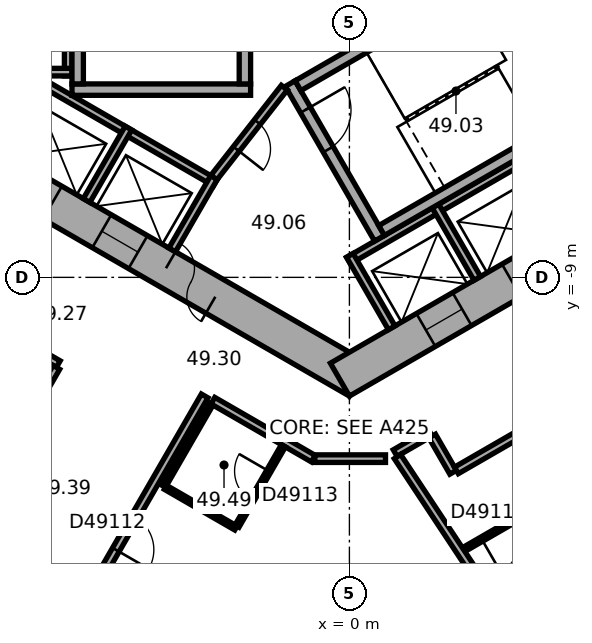
"""IFC4 building model, lengths in metres.
Left out: names, types, materials, properties, quantities, classifications, styles, units other than length and angle.
Written with IfcOpenShell. Run it as: python <this file> out.ifc"""

import sys

from ifc_helpers import new_model, si_unit, direction, frame, frame_2d, origin, place, context, subcontext, project, spatial, rectangle, extrude, element, fill, save


model = new_model("IFC4")
c1 = context("Model", 3, precision=1e-05, world=origin(), true_north=direction((0.0, 1.0)))
c2 = subcontext(c1, "Body", "Model", "MODEL_VIEW")
j1 = project(units=[si_unit("LENGTHUNIT", "METRE"), si_unit("PLANEANGLEUNIT", "RADIAN")], contexts=[c1])
p1 = place(None, origin())
s1 = spatial("IfcSite", under=j1, at=p1, CompositionType="ELEMENT")
p2 = place(p1, origin())
s2 = spatial("IfcBuilding", under=s1, at=p2, CompositionType="ELEMENT")
p3 = place(p2, frame((0.0, 0.0, 198.4)))
s3 = spatial("IfcBuildingStorey", under=s2, at=p3, CompositionType="ELEMENT", Elevation=198.4)
p4 = place(p3, frame((-10.25, -5.629, 0.0), z_axis=(0.0, 0.0, 1.0), x_axis=(0.866022616891, -0.50000482701, 0.0)))
e1 = element("IfcWall", 1, at=p4, inside=s3, PredefinedType="SHEAR", context=c2, shape_type="SweptSolid", body=[
    extrude(rectangle(XDim=12.125, YDim=1.0, at=frame_2d((6.062, 0.0))), origin(), (0.0, 0.0, 1.0), 3.7),
])
p5 = place(p4, frame((6.262, 0.0, 0.0)))
e2 = element("IfcOpeningElement", 2, at=p5, cuts=e1, PredefinedType="OPENING", context=c2, shape_type="SweptSolid", body=[
    extrude(rectangle(XDim=1.5, YDim=2.1, at=frame_2d((0.75, 1.05))), frame((0.0, 0.51, 0.0), z_axis=(0.0, -1.0, 0.0), x_axis=(1.0, 0.0, 0.0)), (0.0, 0.0, 1.0), 1.02),
])
p6 = place(p4, frame((1.712, 0.0, 0.0)))
e3 = element("IfcOpeningElement", 3, at=p6, cuts=e1, PredefinedType="OPENING", context=c2, shape_type="SweptSolid", body=[
    extrude(rectangle(XDim=1.1, YDim=2.1, at=frame_2d((0.55, 1.05))), frame((0.0, 0.51, 0.0), z_axis=(0.0, -1.0, 0.0), x_axis=(1.0, 0.0, 0.0)), (0.0, 0.0, 1.0), 1.02),
])
p7 = place(p4, frame((4.312, 0.0, 0.0)))
e4 = element("IfcOpeningElement", 4, at=p7, cuts=e1, PredefinedType="OPENING", context=c2, shape_type="SweptSolid", body=[
    extrude(rectangle(XDim=1.1, YDim=2.1, at=frame_2d((0.55, 1.05))), frame((0.0, 0.51, 0.0), z_axis=(0.0, -1.0, 0.0), x_axis=(1.0, 0.0, 0.0)), (0.0, 0.0, 1.0), 1.02),
])
p8 = place(p3, frame((-0.25, -11.691, 0.0), z_axis=(0.0, 0.0, 1.0), x_axis=(0.866022616891, 0.50000482701, 0.0)))
e5 = element("IfcWall", 5, at=p8, inside=s3, PredefinedType="SHEAR", context=c2, shape_type="SweptSolid", body=[
    extrude(rectangle(XDim=12.125, YDim=1.0, at=frame_2d((6.062, 0.0))), origin(), (0.0, 0.0, 1.0), 3.7),
])
p9 = place(p8, frame((2.612, 0.0, 0.0)))
e6 = element("IfcOpeningElement", 6, at=p9, cuts=e5, PredefinedType="OPENING", context=c2, shape_type="SweptSolid", body=[
    extrude(rectangle(XDim=1.1, YDim=2.1, at=frame_2d((0.55, 1.05))), frame((0.0, 0.51, 0.0), z_axis=(0.0, -1.0, 0.0), x_axis=(1.0, 0.0, 0.0)), (0.0, 0.0, 1.0), 1.02),
])
p10 = place(p8, frame((5.212, 0.0, 0.0)))
e7 = element("IfcOpeningElement", 7, at=p10, cuts=e5, PredefinedType="OPENING", context=c2, shape_type="SweptSolid", body=[
    extrude(rectangle(XDim=1.1, YDim=2.1, at=frame_2d((0.55, 1.05))), frame((0.0, 0.51, 0.0), z_axis=(0.0, -1.0, 0.0), x_axis=(1.0, 0.0, 0.0)), (0.0, 0.0, 1.0), 1.02),
])
p11 = place(p8, frame((7.812, 0.0, 0.0)))
e8 = element("IfcOpeningElement", 8, at=p11, cuts=e5, PredefinedType="OPENING", context=c2, shape_type="SweptSolid", body=[
    extrude(rectangle(XDim=1.1, YDim=2.1, at=frame_2d((0.55, 1.05))), frame((0.0, 0.51, 0.0), z_axis=(0.0, -1.0, 0.0), x_axis=(1.0, 0.0, 0.0)), (0.0, 0.0, 1.0), 1.02),
])
p12 = place(p3, frame((-18.789, -14.267, 0.0), z_axis=(0.0, 0.0, 1.0), x_axis=(0.866023315909, -0.500003616288, 0.0)))
e9 = element("IfcWall", 9, at=p12, inside=s3, PredefinedType="STANDARD", context=c2, shape_type="SweptSolid", body=[
    extrude(rectangle(XDim=20.044, YDim=0.2, at=frame_2d((10.022, 0.0))), origin(), (0.0, 0.0, 1.0), 3.7),
])
p13 = place(p12, frame((1.314, 0.0, 0.9)))
e10 = element("IfcOpeningElement", 10, at=p13, cuts=e9, PredefinedType="OPENING", context=c2, shape_type="SweptSolid", body=[
    extrude(rectangle(XDim=2.4, YDim=2.0, at=frame_2d((1.2, 1.0))), frame((0.0, 0.11, 0.0), z_axis=(0.0, -1.0, 0.0), x_axis=(1.0, 0.0, 0.0)), (0.0, 0.0, 1.0), 0.22),
])
p14 = place(p12, frame((5.069, 0.0, 0.9)))
e11 = element("IfcOpeningElement", 11, at=p14, cuts=e9, PredefinedType="OPENING", context=c2, shape_type="SweptSolid", body=[
    extrude(rectangle(XDim=2.4, YDim=2.0, at=frame_2d((1.2, 1.0))), frame((0.0, 0.11, 0.0), z_axis=(0.0, -1.0, 0.0), x_axis=(1.0, 0.0, 0.0)), (0.0, 0.0, 1.0), 0.22),
])
p15 = place(p12, frame((8.823, 0.0, 0.9)))
e12 = element("IfcOpeningElement", 12, at=p15, cuts=e9, PredefinedType="OPENING", context=c2, shape_type="SweptSolid", body=[
    extrude(rectangle(XDim=2.4, YDim=2.0, at=frame_2d((1.2, 1.0))), frame((0.0, 0.11, 0.0), z_axis=(0.0, -1.0, 0.0), x_axis=(1.0, 0.0, 0.0)), (0.0, 0.0, 1.0), 0.22),
])
p16 = place(p12, frame((12.577, 0.0, 0.9)))
e13 = element("IfcOpeningElement", 13, at=p16, cuts=e9, PredefinedType="OPENING", context=c2, shape_type="SweptSolid", body=[
    extrude(rectangle(XDim=2.4, YDim=2.0, at=frame_2d((1.2, 1.0))), frame((0.0, 0.11, 0.0), z_axis=(0.0, -1.0, 0.0), x_axis=(1.0, 0.0, 0.0)), (0.0, 0.0, 1.0), 0.22),
])
p17 = place(p12, frame((16.331, 0.0, 0.9)))
e14 = element("IfcOpeningElement", 14, at=p17, cuts=e9, PredefinedType="OPENING", context=c2, shape_type="SweptSolid", body=[
    extrude(rectangle(XDim=2.4, YDim=2.0, at=frame_2d((1.2, 1.0))), frame((0.0, 0.11, 0.0), z_axis=(0.0, -1.0, 0.0), x_axis=(1.0, 0.0, 0.0)), (0.0, 0.0, 1.0), 0.22),
])
p18 = place(p3, frame((2.911, -24.156, 0.0), z_axis=(0.0, 0.0, 1.0), x_axis=(0.833882163564, 0.551942512668, 0.0)))
e15 = element("IfcWall", 15, at=p18, inside=s3, PredefinedType="STANDARD", context=c2, shape_type="SweptSolid", body=[
    extrude(rectangle(XDim=20.044, YDim=0.2, at=frame_2d((10.022, 0.0))), origin(), (0.0, 0.0, 1.0), 3.7),
])
p19 = place(p18, frame((1.313, 0.0, 0.9)))
e16 = element("IfcOpeningElement", 16, at=p19, cuts=e15, PredefinedType="OPENING", context=c2, shape_type="SweptSolid", body=[
    extrude(rectangle(XDim=2.4, YDim=2.0, at=frame_2d((1.2, 1.0))), frame((0.0, 0.11, 0.0), z_axis=(0.0, -1.0, 0.0), x_axis=(1.0, 0.0, 0.0)), (0.0, 0.0, 1.0), 0.22),
])
p20 = place(p18, frame((5.067, 0.0, 0.9)))
e17 = element("IfcOpeningElement", 17, at=p20, cuts=e15, PredefinedType="OPENING", context=c2, shape_type="SweptSolid", body=[
    extrude(rectangle(XDim=2.4, YDim=2.0, at=frame_2d((1.2, 1.0))), frame((0.0, 0.11, 0.0), z_axis=(0.0, -1.0, 0.0), x_axis=(1.0, 0.0, 0.0)), (0.0, 0.0, 1.0), 0.22),
])
p21 = place(p18, frame((8.821, 0.0, 0.9)))
e18 = element("IfcOpeningElement", 18, at=p21, cuts=e15, PredefinedType="OPENING", context=c2, shape_type="SweptSolid", body=[
    extrude(rectangle(XDim=2.4, YDim=2.0, at=frame_2d((1.2, 1.0))), frame((0.0, 0.11, 0.0), z_axis=(0.0, -1.0, 0.0), x_axis=(1.0, 0.0, 0.0)), (0.0, 0.0, 1.0), 0.22),
])
p22 = place(p18, frame((12.575, 0.0, 0.9)))
e19 = element("IfcOpeningElement", 19, at=p22, cuts=e15, PredefinedType="OPENING", context=c2, shape_type="SweptSolid", body=[
    extrude(rectangle(XDim=2.4, YDim=2.0, at=frame_2d((1.2, 1.0))), frame((0.0, 0.11, 0.0), z_axis=(0.0, -1.0, 0.0), x_axis=(1.0, 0.0, 0.0)), (0.0, 0.0, 1.0), 0.22),
])
p23 = place(p18, frame((16.329, 0.0, 0.9)))
e20 = element("IfcOpeningElement", 20, at=p23, cuts=e15, PredefinedType="OPENING", context=c2, shape_type="SweptSolid", body=[
    extrude(rectangle(XDim=2.4, YDim=2.0, at=frame_2d((1.2, 1.0))), frame((0.0, 0.11, 0.0), z_axis=(0.0, -1.0, 0.0), x_axis=(1.0, 0.0, 0.0)), (0.0, 0.0, 1.0), 0.22),
])
p24 = place(p3, frame((-7.4, 4.3, 0.0), z_axis=(0.0, 0.0, 1.0), x_axis=(0.0, -1.0, 0.0)))
e21 = element("IfcWall", 21, at=p24, inside=s3, PredefinedType="PARTITIONING", context=c2, shape_type="SweptSolid", body=[
    extrude(rectangle(XDim=8.0, YDim=0.2, at=frame_2d((4.0, 0.0))), origin(), (0.0, 0.0, 1.0), 3.42),
])
p25 = place(p3, frame((-7.3, -3.6, 0.0), z_axis=(0.0, 0.0, 1.0), x_axis=(-1.0, 0.0, 0.0)))
e22 = element("IfcWall", 22, at=p25, inside=s3, PredefinedType="PARTITIONING", context=c2, shape_type="SweptSolid", body=[
    extrude(rectangle(XDim=2.2, YDim=0.2, at=frame_2d((1.1, 0.0))), origin(), (0.0, 0.0, 1.0), 3.42),
])
p26 = place(p3, frame((-8.203, -3.809, 0.0), z_axis=(0.0, 0.0, 1.0), x_axis=(0.866028230842, -0.499995103361, 0.0)))
e23 = element("IfcWall", 23, at=p26, inside=s3, PredefinedType="PARTITIONING", context=c2, shape_type="SweptSolid", body=[
    extrude(rectangle(XDim=5.4, YDim=0.2, at=frame_2d((2.7, 0.0))), origin(), (0.0, 0.0, 1.0), 3.42),
])
p27 = place(p3, frame((-5.815, -5.072, 0.0), z_axis=(0.0, 0.0, 1.0), x_axis=(-0.499946605688, -0.86605622881, 0.0)))
e24 = element("IfcWall", 24, at=p27, inside=s3, PredefinedType="PARTITIONING", context=c2, shape_type="SweptSolid", body=[
    extrude(rectangle(XDim=2.2, YDim=0.2, at=frame_2d((1.1, 0.0))), origin(), (0.0, 0.0, 1.0), 3.42),
])
p28 = place(p3, frame((-3.563, -6.372, 0.0), z_axis=(0.0, 0.0, 1.0), x_axis=(-0.499994660107, -0.866028486751, 0.0)))
e25 = element("IfcWall", 25, at=p28, inside=s3, PredefinedType="PARTITIONING", context=c2, shape_type="SweptSolid", body=[
    extrude(rectangle(XDim=2.2, YDim=0.2, at=frame_2d((1.1, 0.0))), origin(), (0.0, 0.0, 1.0), 3.42),
])
p29 = place(p3, frame((-0.024, -8.559, 0.0), z_axis=(0.0, 0.0, 1.0), x_axis=(0.866026010844, 0.49999894854, 0.0)))
e26 = element("IfcWall", 26, at=p29, inside=s3, PredefinedType="PARTITIONING", context=c2, shape_type="SweptSolid", body=[
    extrude(rectangle(XDim=8.0, YDim=0.2, at=frame_2d((4.0, 0.0))), origin(), (0.0, 0.0, 1.0), 3.42),
])
for number, where, z_axis, x_axis in (
    (27, (0.013, -8.422, 0.0), (0.0, 0.0, 1.0), (0.5, -0.866, 0.0)),
    (28, (2.264, -7.122, 0.0), (0.0, 0.0, 1.0), (0.5, -0.866, 0.0)),
):
    element("IfcWall", number, at=place(p3, frame(where, z_axis=z_axis, x_axis=x_axis)), inside=s3, PredefinedType="PARTITIONING", context=c2, shape_type="SweptSolid", body=[
        extrude(rectangle(XDim=2.2, YDim=0.2, at=frame_2d((1.1, 0.0))), origin(), (0.0, 0.0, 1.0), 3.42),
    ])
p30 = place(p3, frame((-2.6, -4.06, 0.0), z_axis=(0.0, 0.0, 1.0), x_axis=(-1.0, 0.0, 0.0)))
e29 = element("IfcWall", 29, at=p30, inside=s3, PredefinedType="SHEAR", context=c2, shape_type="SweptSolid", body=[
    extrude(rectangle(XDim=4.7, YDim=0.3, at=frame_2d((2.35, 0.0))), origin(), (0.0, 0.0, 1.0), 3.42),
])
for number, where, z_axis, x_axis in (
    (30, (-2.75, 3.15, 0.0), (0.0, 0.0, 1.0), (0.0, -1.0, 0.0)),
    (31, (-7.15, 3.15, 0.0), (0.0, 0.0, 1.0), (0.0, -1.0, 0.0)),
):
    element("IfcWall", number, at=place(p3, frame(where, z_axis=z_axis, x_axis=x_axis)), inside=s3, PredefinedType="SHEAR", context=c2, shape_type="SweptSolid", body=[
        extrude(rectangle(XDim=7.06, YDim=0.3, at=frame_2d((3.53, 0.0))), origin(), (0.0, 0.0, 1.0), 3.42),
    ])
p31 = place(p3, frame((-1.558, -3.902, 0.0), z_axis=(0.0, 0.0, 1.0), x_axis=(0.499977259774, -0.866038532462, 0.0)))
e32 = element("IfcWall", 32, at=p31, inside=s3, PredefinedType="SHEAR", context=c2, shape_type="SweptSolid", body=[
    extrude(rectangle(XDim=4.7, YDim=0.3, at=frame_2d((2.35, 0.0))), origin(), (0.0, 0.0, 1.0), 3.42),
])
p32 = place(p31, frame((0.8, 0.0, 0.0)))
e33 = element("IfcOpeningElement", 33, at=p32, cuts=e32, PredefinedType="OPENING", context=c2, shape_type="SweptSolid", body=[
    extrude(rectangle(XDim=1.2, YDim=2.1, at=frame_2d((0.6, 1.05))), frame((0.0, 0.16, 0.0), z_axis=(0.0, -1.0, 0.0), x_axis=(1.0, 0.0, 0.0)), (0.0, 0.0, 1.0), 0.32),
])
for number, where, z_axis, x_axis in (
    (34, (-1.353, -3.957, 0.0), (0.0, 0.0, 1.0), (0.866, 0.5, 0.0)),
    (35, (0.847, -7.767, 0.0), (0.0, 0.0, 1.0), (0.866, 0.5, 0.0)),
):
    element("IfcWall", number, at=place(p3, frame(where, z_axis=z_axis, x_axis=x_axis)), inside=s3, PredefinedType="SHEAR", context=c2, shape_type="SweptSolid", body=[
        extrude(rectangle(XDim=7.06, YDim=0.3, at=frame_2d((3.53, 0.0))), origin(), (0.0, 0.0, 1.0), 3.42),
    ])
p33 = place(p3, frame((-1.712, -4.008, 0.0), z_axis=(0.0, 0.0, 1.0), x_axis=(-0.616549420702, -0.787316208287, 0.0)))
e36 = element("IfcWall", 36, at=p33, inside=s3, PredefinedType="PARTITIONING", context=c2, shape_type="SweptSolid", body=[
    extrude(rectangle(XDim=3.002, YDim=0.2, at=frame_2d((1.501, 0.0))), origin(), (0.0, 0.0, 1.0), 3.42),
])
p34 = place(p33, frame((1.15, 0.0, 0.0)))
e37 = element("IfcOpeningElement", 37, at=p34, cuts=e36, PredefinedType="OPENING", context=c2, shape_type="SweptSolid", body=[
    extrude(rectangle(XDim=0.9, YDim=2.1, at=frame_2d((0.45, 1.05))), frame((0.0, 0.11, 0.0), z_axis=(0.0, -1.0, 0.0), x_axis=(1.0, 0.0, 0.0)), (0.0, 0.0, 1.0), 0.22),
])
p35 = place(p3, frame((-11.435, -9.103, 0.0), z_axis=(0.0, 0.0, 1.0), x_axis=(0.866007399799, -0.500031182522, 0.0)))
e38 = element("IfcWall", 38, at=p35, inside=s3, PredefinedType="PARTITIONING", context=c2, shape_type="SweptSolid", body=[
    extrude(rectangle(XDim=4.358, YDim=0.2, at=frame_2d((2.179, 0.0))), origin(), (0.0, 0.0, 1.0), 3.42),
])
p36 = place(p3, frame((-11.235, -17.474, 0.0), z_axis=(0.0, 0.0, 1.0), x_axis=(0.500009260695, 0.866020057054, 0.0)))
e39 = element("IfcWall", 39, at=p36, inside=s3, PredefinedType="PARTITIONING", context=c2, shape_type="SweptSolid", body=[
    extrude(rectangle(XDim=7.049, YDim=0.2, at=frame_2d((3.524, 0.0))), origin(), (0.0, 0.0, 1.0), 2.87),
])
p37 = place(p36, frame((3.024, 0.0, 0.0)))
e40 = element("IfcOpeningElement", 40, at=p37, cuts=e39, PredefinedType="OPENING", context=c2, shape_type="SweptSolid", body=[
    extrude(rectangle(XDim=1.0, YDim=2.1, at=frame_2d((0.5, 1.05))), frame((0.0, 0.11, 0.0), z_axis=(0.0, -1.0, 0.0), x_axis=(1.0, 0.0, 0.0)), (0.0, 0.0, 1.0), 0.22),
])
p38 = place(p3, frame((-7.984, -19.351, 0.0), z_axis=(0.0, 0.0, 1.0), x_axis=(0.500010139422, 0.866019549707, 0.0)))
e41 = element("IfcWall", 41, at=p38, inside=s3, PredefinedType="PARTITIONING", context=c2, shape_type="SweptSolid", body=[
    extrude(rectangle(XDim=8.35, YDim=0.2, at=frame_2d((4.175, 0.0))), origin(), (0.0, 0.0, 1.0), 3.42),
])
p39 = place(p38, frame((3.675, 0.0, 0.0)))
e42 = element("IfcOpeningElement", 42, at=p39, cuts=e41, PredefinedType="OPENING", context=c2, shape_type="SweptSolid", body=[
    extrude(rectangle(XDim=1.0, YDim=2.1, at=frame_2d((0.5, 1.05))), frame((0.0, 0.11, 0.0), z_axis=(0.0, -1.0, 0.0), x_axis=(1.0, 0.0, 0.0)), (0.0, 0.0, 1.0), 0.22),
])
p40 = place(p3, frame((-4.892, -14.496, 0.0), z_axis=(0.0, 0.0, 1.0), x_axis=(0.500004234368, 0.866022959057, 0.0)))
e43 = element("IfcWall", 43, at=p40, inside=s3, PredefinedType="PARTITIONING", context=c2, shape_type="SweptSolid", body=[
    extrude(rectangle(XDim=2.5, YDim=0.12, at=frame_2d((1.25, 0.0))), origin(), (0.0, 0.0, 1.0), 3.42),
])
p41 = place(p3, frame((-3.592, -12.244, 0.0), z_axis=(0.0, 0.0, 1.0), x_axis=(0.866028335764, -0.499994921628, 0.0)))
e44 = element("IfcWall", 44, at=p41, inside=s3, PredefinedType="PARTITIONING", context=c2, shape_type="SweptSolid", body=[
    extrude(rectangle(XDim=3.051, YDim=0.2, at=frame_2d((1.525, 0.0))), origin(), (0.0, 0.0, 1.0), 3.42),
])
p42 = place(p3, frame((-2.987, -15.596, 0.0), z_axis=(0.0, 0.0, 1.0), x_axis=(-0.86600889856, 0.500028586798, 0.0)))
e45 = element("IfcWall", 45, at=p42, inside=s3, PredefinedType="PARTITIONING", context=c2, shape_type="SweptSolid", body=[
    extrude(rectangle(XDim=2.14, YDim=0.12, at=frame_2d((1.07, 0.0))), origin(), (0.0, 0.0, 1.0), 3.42),
])
p43 = place(p3, frame((-1.737, -13.431, 0.0), z_axis=(0.0, 0.0, 1.0), x_axis=(-0.499959183527, -0.866048967903, 0.0)))
e46 = element("IfcWall", 46, at=p43, inside=s3, PredefinedType="PARTITIONING", context=c2, shape_type="SweptSolid", body=[
    extrude(rectangle(XDim=2.44, YDim=0.12, at=frame_2d((1.22, 0.0))), origin(), (0.0, 0.0, 1.0), 3.42),
])
p44 = place(p43, frame((0.77, 0.0, 0.0)))
e47 = element("IfcOpeningElement", 47, at=p44, cuts=e46, PredefinedType="OPENING", context=c2, shape_type="SweptSolid", body=[
    extrude(rectangle(XDim=0.9, YDim=2.1, at=frame_2d((0.45, 1.05))), frame((0.0, 0.07, 0.0), z_axis=(0.0, -1.0, 0.0), x_axis=(1.0, 0.0, 0.0)), (0.0, 0.0, 1.0), 0.14),
])
p45 = place(p3, frame((-0.91, -13.77, 0.0), z_axis=(0.0, 0.0, 1.0), x_axis=(1.0, 0.0, 0.0)))
e48 = element("IfcWall", 48, at=p45, inside=s3, PredefinedType="PARTITIONING", context=c2, shape_type="SweptSolid", body=[
    extrude(rectangle(XDim=1.86, YDim=0.2, at=frame_2d((0.93, 0.0))), origin(), (0.0, 0.0, 1.0), 3.42),
])
p46 = place(p3, frame((1.204, -13.623, 0.0), z_axis=(0.0, 0.0, 1.0), x_axis=(0.866040989419, 0.499973003918, 0.0)))
e49 = element("IfcWall", 49, at=p46, inside=s3, PredefinedType="PARTITIONING", context=c2, shape_type="SweptSolid", body=[
    extrude(rectangle(XDim=1.068, YDim=0.2, at=frame_2d((0.534, 0.0))), origin(), (0.0, 0.0, 1.0), 3.42),
])
p47 = place(p3, frame((2.179, -13.176, 0.0), z_axis=(0.0, 0.0, 1.0), x_axis=(0.499978356969, -0.866037899034, 0.0)))
e50 = element("IfcWall", 50, at=p47, inside=s3, PredefinedType="PARTITIONING", context=c2, shape_type="SweptSolid", body=[
    extrude(rectangle(XDim=1.101, YDim=0.2, at=frame_2d((0.551, 0.0))), origin(), (0.0, 0.0, 1.0), 3.42),
])
p48 = place(p3, frame((2.816, -14.079, 0.0), z_axis=(0.0, 0.0, 1.0), x_axis=(0.866021128829, 0.500007404367, 0.0)))
e51 = element("IfcWall", 51, at=p48, inside=s3, PredefinedType="PARTITIONING", context=c2, shape_type="SweptSolid", body=[
    extrude(rectangle(XDim=8.702, YDim=0.2, at=frame_2d((4.351, 0.0))), origin(), (0.0, 0.0, 1.0), 3.42),
])
p49 = place(p48, frame((2.714, 0.0, 0.0)))
e52 = element("IfcOpeningElement", 52, at=p49, cuts=e51, PredefinedType="OPENING", context=c2, shape_type="SweptSolid", body=[
    extrude(rectangle(XDim=1.0, YDim=2.1, at=frame_2d((0.5, 1.05))), frame((0.0, 0.11, 0.0), z_axis=(0.0, -1.0, 0.0), x_axis=(1.0, 0.0, 0.0)), (0.0, 0.0, 1.0), 0.22),
])
p50 = place(p3, frame((3.005, -16.164, 0.0), z_axis=(0.0, 0.0, 1.0), x_axis=(0.866018452427, 0.500012039911, 0.0)))
e53 = element("IfcWall", 53, at=p50, inside=s3, PredefinedType="PARTITIONING", context=c2, shape_type="SweptSolid", body=[
    extrude(rectangle(XDim=7.322, YDim=0.12, at=frame_2d((3.661, 0.0))), origin(), (0.0, 0.0, 1.0), 3.42),
])
p51 = place(p50, frame((0.55, 0.0, 0.0)))
e54 = element("IfcOpeningElement", 54, at=p51, cuts=e53, PredefinedType="OPENING", context=c2, shape_type="SweptSolid", body=[
    extrude(rectangle(XDim=1.0, YDim=2.1, at=frame_2d((0.5, 1.05))), frame((0.0, 0.07, 0.0), z_axis=(0.0, -1.0, 0.0), x_axis=(1.0, 0.0, 0.0)), (0.0, 0.0, 1.0), 0.14),
])
p52 = place(p50, frame((2.736, 0.0, 0.0)))
e55 = element("IfcOpeningElement", 55, at=p52, cuts=e53, PredefinedType="OPENING", context=c2, shape_type="SweptSolid", body=[
    extrude(rectangle(XDim=0.9, YDim=2.1, at=frame_2d((0.45, 1.05))), frame((0.0, 0.07, 0.0), z_axis=(0.0, -1.0, 0.0), x_axis=(1.0, 0.0, 0.0)), (0.0, 0.0, 1.0), 0.14),
])
p53 = place(p50, frame((5.347, 0.0, 0.0)))
e56 = element("IfcOpeningElement", 56, at=p53, cuts=e53, PredefinedType="OPENING", context=c2, shape_type="SweptSolid", body=[
    extrude(rectangle(XDim=0.9, YDim=2.1, at=frame_2d((0.45, 1.05))), frame((0.0, 0.07, 0.0), z_axis=(0.0, -1.0, 0.0), x_axis=(1.0, 0.0, 0.0)), (0.0, 0.0, 1.0), 0.14),
])
p54 = place(p3, frame((6.02, -20.899, 0.0), z_axis=(0.0, 0.0, 1.0), x_axis=(-0.551943990108, 0.833881185651, 0.0)))
e57 = element("IfcWall", 57, at=p54, inside=s3, PredefinedType="PARTITIONING", context=c2, shape_type="SweptSolid", body=[
    extrude(rectangle(XDim=8.615, YDim=0.2, at=frame_2d((4.308, 0.0))), origin(), (0.0, 0.0, 1.0), 3.42),
])
p55 = place(p5, origin())
e58 = element("IfcDoor", 58, at=p55, inside=s3, OperationType="DOUBLE_DOOR_SINGLE_SWING", PredefinedType="DOOR", context=c2, shape_type="SweptSolid", body=[
    extrude(rectangle(XDim=1.5, YDim=2.1, at=frame_2d((0.75, 1.05))), frame((0.0, 0.025, 0.0), z_axis=(0.0, -1.0, 0.0), x_axis=(1.0, 0.0, 0.0)), (0.0, 0.0, 1.0), 0.05),
])
fill(e2, e58)
p56 = place(p32, origin())
e59 = element("IfcDoor", 59, at=p56, inside=s3, OperationType="SINGLE_SWING_RIGHT", PredefinedType="DOOR", context=c2, shape_type="SweptSolid", body=[
    extrude(rectangle(XDim=1.2, YDim=2.1, at=frame_2d((0.6, 1.05))), frame((0.0, 0.025, 0.0), z_axis=(0.0, -1.0, 0.0), x_axis=(1.0, 0.0, 0.0)), (0.0, 0.0, 1.0), 0.05),
])
fill(e33, e59)
p57 = place(p34, origin())
e60 = element("IfcDoor", 60, at=p57, inside=s3, OperationType="SINGLE_SWING_LEFT", PredefinedType="DOOR", context=c2, shape_type="SweptSolid", body=[
    extrude(rectangle(XDim=0.9, YDim=2.1, at=frame_2d((0.45, 1.05))), frame((0.0, 0.025, 0.0), z_axis=(0.0, -1.0, 0.0), x_axis=(1.0, 0.0, 0.0)), (0.0, 0.0, 1.0), 0.05),
])
fill(e37, e60)
p58 = place(p6, origin())
e61 = element("IfcDoor", 61, at=p58, inside=s3, OperationType="DOUBLE_DOOR_SLIDING", PredefinedType="DOOR", context=c2, shape_type="SweptSolid", body=[
    extrude(rectangle(XDim=1.1, YDim=2.1, at=frame_2d((0.55, 1.05))), frame((0.0, 0.025, 0.0), z_axis=(0.0, -1.0, 0.0), x_axis=(1.0, 0.0, 0.0)), (0.0, 0.0, 1.0), 0.05),
])
fill(e3, e61)
p59 = place(p7, origin())
e62 = element("IfcDoor", 62, at=p59, inside=s3, OperationType="DOUBLE_DOOR_SLIDING", PredefinedType="DOOR", context=c2, shape_type="SweptSolid", body=[
    extrude(rectangle(XDim=1.1, YDim=2.1, at=frame_2d((0.55, 1.05))), frame((0.0, 0.025, 0.0), z_axis=(0.0, -1.0, 0.0), x_axis=(1.0, 0.0, 0.0)), (0.0, 0.0, 1.0), 0.05),
])
fill(e4, e62)
p60 = place(p9, origin())
e63 = element("IfcDoor", 63, at=p60, inside=s3, OperationType="DOUBLE_DOOR_SLIDING", PredefinedType="DOOR", context=c2, shape_type="SweptSolid", body=[
    extrude(rectangle(XDim=1.1, YDim=2.1, at=frame_2d((0.55, 1.05))), frame((0.0, 0.025, 0.0), z_axis=(0.0, -1.0, 0.0), x_axis=(1.0, 0.0, 0.0)), (0.0, 0.0, 1.0), 0.05),
])
fill(e6, e63)
p61 = place(p10, origin())
e64 = element("IfcDoor", 64, at=p61, inside=s3, OperationType="DOUBLE_DOOR_SLIDING", PredefinedType="DOOR", context=c2, shape_type="SweptSolid", body=[
    extrude(rectangle(XDim=1.1, YDim=2.1, at=frame_2d((0.55, 1.05))), frame((0.0, 0.025, 0.0), z_axis=(0.0, -1.0, 0.0), x_axis=(1.0, 0.0, 0.0)), (0.0, 0.0, 1.0), 0.05),
])
fill(e7, e64)
p62 = place(p39, origin())
e65 = element("IfcDoor", 65, at=p62, inside=s3, OperationType="SINGLE_SWING_LEFT", PredefinedType="DOOR", context=c2, shape_type="SweptSolid", body=[
    extrude(rectangle(XDim=1.0, YDim=2.1, at=frame_2d((0.5, 1.05))), frame((0.0, 0.025, 0.0), z_axis=(0.0, -1.0, 0.0), x_axis=(1.0, 0.0, 0.0)), (0.0, 0.0, 1.0), 0.05),
])
fill(e42, e65)
p63 = place(p44, origin())
e66 = element("IfcDoor", 66, at=p63, inside=s3, OperationType="SINGLE_SWING_LEFT", PredefinedType="DOOR", context=c2, shape_type="SweptSolid", body=[
    extrude(rectangle(XDim=0.9, YDim=2.1, at=frame_2d((0.45, 1.05))), frame((0.0, 0.025, 0.0), z_axis=(0.0, -1.0, 0.0), x_axis=(1.0, 0.0, 0.0)), (0.0, 0.0, 1.0), 0.05),
])
fill(e47, e66)
p64 = place(p51, origin())
e67 = element("IfcDoor", 67, at=p64, inside=s3, OperationType="SINGLE_SWING_LEFT", PredefinedType="DOOR", context=c2, shape_type="SweptSolid", body=[
    extrude(rectangle(XDim=1.0, YDim=2.1, at=frame_2d((0.5, 1.05))), frame((0.0, 0.025, 0.0), z_axis=(0.0, -1.0, 0.0), x_axis=(1.0, 0.0, 0.0)), (0.0, 0.0, 1.0), 0.05),
])
fill(e54, e67)
save(model, sys.argv[1])
